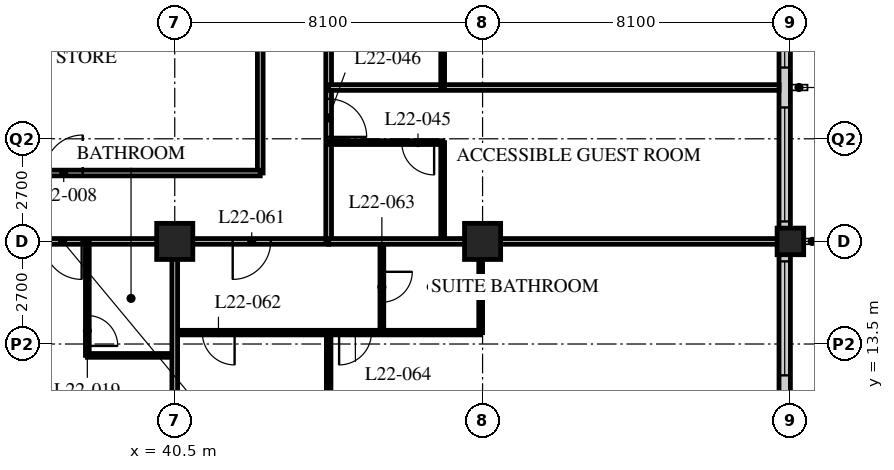
"""IFC4 building model, lengths in metres.
Left out: names, types, materials, properties, quantities, classifications, styles, units other than length and angle.
Written with IfcOpenShell. Run it as: python <this file> out.ifc"""

import sys

from ifc_helpers import new_model, si_unit, direction, frame, frame_2d, origin, origin_2d, place, context, subcontext, project, spatial, rectangle, hollow_rectangle, extrude, element, fill, save


model = new_model("IFC4")
c1 = context("Model", 3, precision=1e-05, world=origin(), true_north=direction((0.0, 1.0)))
c2 = subcontext(c1, "Body", "Model", "MODEL_VIEW")
j1 = project(units=[si_unit("LENGTHUNIT", "METRE"), si_unit("PLANEANGLEUNIT", "RADIAN")], contexts=[c1])
p1 = place(None, origin())
s1 = spatial("IfcSite", under=j1, at=p1, CompositionType="ELEMENT")
p2 = place(p1, origin())
s2 = spatial("IfcBuilding", under=s1, at=p2, CompositionType="ELEMENT")
p3 = place(p2, frame((0.0, 0.0, 87.4)))
s3 = spatial("IfcBuildingStorey", under=s2, at=p3, CompositionType="ELEMENT", Elevation=87.4)
for number, where, z_axis, x_axis in (
    (1, (40.5, 16.2, 0.0), (0.0, 0.0, 1.0), (1.0, 0.0, 0.0)),
    (2, (48.6, 16.2, 0.0), (0.0, 0.0, 1.0), (1.0, 0.0, 0.0)),
):
    element("IfcColumn", number, at=place(p3, frame(where, z_axis=z_axis, x_axis=x_axis)), inside=s3, PredefinedType="COLUMN", context=c2, shape_type="SweptSolid", body=[
        extrude(hollow_rectangle(XDim=0.95, YDim=0.95, WallThickness=0.095, at=origin_2d()), origin(), (0.0, 0.0, 1.0), 3.4),
    ])
p4 = place(p3, frame((56.7, 16.2, 0.0), z_axis=(0.0, 0.0, 1.0), x_axis=(1.0, 0.0, 0.0)))
e3 = element("IfcColumn", 3, at=p4, inside=s3, PredefinedType="COLUMN", context=c2, shape_type="SweptSolid", body=[
    extrude(hollow_rectangle(XDim=0.7, YDim=0.7, WallThickness=0.06, at=origin_2d()), origin(), (0.0, 0.0, 1.0), 3.4),
])
p5 = place(p3, frame((56.55, 8.4, 0.0), z_axis=(0.0, 0.0, 1.0), x_axis=(0.0, 1.0, 0.0)))
e4 = element("IfcWall", 4, at=p5, inside=s3, PredefinedType="SOLIDWALL", context=c2, shape_type="SweptSolid", body=[
    extrude(rectangle(XDim=32.1, YDim=0.3, at=frame_2d((16.05, 0.0))), origin(), (0.0, 0.0, 1.0), 2.05),
])
p6 = place(p5, frame((0.225, 0.0, 0.9)))
e5 = element("IfcOpeningElement", 5, at=p6, cuts=e4, PredefinedType="OPENING", context=c2, shape_type="SweptSolid", body=[
    extrude(rectangle(XDim=3.0, YDim=1.1, at=frame_2d((1.5, 0.55))), frame((0.0, 0.16, 0.0), z_axis=(0.0, -1.0, 0.0), x_axis=(1.0, 0.0, 0.0)), (0.0, 0.0, 1.0), 0.32),
])
p7 = place(p5, frame((4.275, 0.0, 0.9)))
e6 = element("IfcOpeningElement", 6, at=p7, cuts=e4, PredefinedType="OPENING", context=c2, shape_type="SweptSolid", body=[
    extrude(rectangle(XDim=3.0, YDim=1.1, at=frame_2d((1.5, 0.55))), frame((0.0, 0.16, 0.0), z_axis=(0.0, -1.0, 0.0), x_axis=(1.0, 0.0, 0.0)), (0.0, 0.0, 1.0), 0.32),
])
p8 = place(p5, frame((8.325, 0.0, 0.9)))
e7 = element("IfcOpeningElement", 7, at=p8, cuts=e4, PredefinedType="OPENING", context=c2, shape_type="SweptSolid", body=[
    extrude(rectangle(XDim=3.0, YDim=1.1, at=frame_2d((1.5, 0.55))), frame((0.0, 0.16, 0.0), z_axis=(0.0, -1.0, 0.0), x_axis=(1.0, 0.0, 0.0)), (0.0, 0.0, 1.0), 0.32),
])
p9 = place(p5, frame((12.375, 0.0, 0.9)))
e8 = element("IfcOpeningElement", 8, at=p9, cuts=e4, PredefinedType="OPENING", context=c2, shape_type="SweptSolid", body=[
    extrude(rectangle(XDim=3.0, YDim=1.1, at=frame_2d((1.5, 0.55))), frame((0.0, 0.16, 0.0), z_axis=(0.0, -1.0, 0.0), x_axis=(1.0, 0.0, 0.0)), (0.0, 0.0, 1.0), 0.32),
])
p10 = place(p5, frame((16.425, 0.0, 0.9)))
e9 = element("IfcOpeningElement", 9, at=p10, cuts=e4, PredefinedType="OPENING", context=c2, shape_type="SweptSolid", body=[
    extrude(rectangle(XDim=3.0, YDim=1.1, at=frame_2d((1.5, 0.55))), frame((0.0, 0.16, 0.0), z_axis=(0.0, -1.0, 0.0), x_axis=(1.0, 0.0, 0.0)), (0.0, 0.0, 1.0), 0.32),
])
p11 = place(p5, frame((20.475, 0.0, 0.9)))
e10 = element("IfcOpeningElement", 10, at=p11, cuts=e4, PredefinedType="OPENING", context=c2, shape_type="SweptSolid", body=[
    extrude(rectangle(XDim=3.0, YDim=1.1, at=frame_2d((1.5, 0.55))), frame((0.0, 0.16, 0.0), z_axis=(0.0, -1.0, 0.0), x_axis=(1.0, 0.0, 0.0)), (0.0, 0.0, 1.0), 0.32),
])
p12 = place(p5, frame((24.525, 0.0, 0.9)))
e11 = element("IfcOpeningElement", 11, at=p12, cuts=e4, PredefinedType="OPENING", context=c2, shape_type="SweptSolid", body=[
    extrude(rectangle(XDim=3.0, YDim=1.1, at=frame_2d((1.5, 0.55))), frame((0.0, 0.16, 0.0), z_axis=(0.0, -1.0, 0.0), x_axis=(1.0, 0.0, 0.0)), (0.0, 0.0, 1.0), 0.32),
])
p13 = place(p5, frame((28.575, 0.0, 0.9)))
e12 = element("IfcOpeningElement", 12, at=p13, cuts=e4, PredefinedType="OPENING", context=c2, shape_type="SweptSolid", body=[
    extrude(rectangle(XDim=3.0, YDim=1.1, at=frame_2d((1.5, 0.55))), frame((0.0, 0.16, 0.0), z_axis=(0.0, -1.0, 0.0), x_axis=(1.0, 0.0, 0.0)), (0.0, 0.0, 1.0), 0.32),
])
p14 = place(p3, frame((12.15, 16.2, 0.0), z_axis=(0.0, 0.0, 1.0), x_axis=(1.0, 0.0, 0.0)))
e13 = element("IfcWall", 13, at=p14, inside=s3, PredefinedType="PARTITIONING", context=c2, shape_type="SweptSolid", body=[
    extrude(rectangle(XDim=32.4, YDim=0.15, at=frame_2d((16.2, 0.0))), origin(), (0.0, 0.0, 1.0), 2.388),
])
p15 = place(p14, frame((6.5, 0.0, 0.0)))
e14 = element("IfcOpeningElement", 14, at=p15, cuts=e13, PredefinedType="OPENING", context=c2, shape_type="SweptSolid", body=[
    extrude(rectangle(XDim=1.0, YDim=2.1, at=frame_2d((0.5, 1.05))), frame((0.0, 0.085, 0.0), z_axis=(0.0, -1.0, 0.0), x_axis=(1.0, 0.0, 0.0)), (0.0, 0.0, 1.0), 0.17),
])
p16 = place(p14, frame((8.4, 0.0, 0.0)))
e15 = element("IfcOpeningElement", 15, at=p16, cuts=e13, PredefinedType="OPENING", context=c2, shape_type="SweptSolid", body=[
    extrude(rectangle(XDim=1.0, YDim=2.1, at=frame_2d((0.5, 1.05))), frame((0.0, 0.085, 0.0), z_axis=(0.0, -1.0, 0.0), x_axis=(1.0, 0.0, 0.0)), (0.0, 0.0, 1.0), 0.17),
])
p17 = place(p14, frame((14.9, 0.0, 0.0)))
e16 = element("IfcOpeningElement", 16, at=p17, cuts=e13, PredefinedType="OPENING", context=c2, shape_type="SweptSolid", body=[
    extrude(rectangle(XDim=1.0, YDim=2.1, at=frame_2d((0.5, 1.05))), frame((0.0, 0.085, 0.0), z_axis=(0.0, -1.0, 0.0), x_axis=(1.0, 0.0, 0.0)), (0.0, 0.0, 1.0), 0.17),
])
p18 = place(p14, frame((16.5, 0.0, 0.0)))
e17 = element("IfcOpeningElement", 17, at=p18, cuts=e13, PredefinedType="OPENING", context=c2, shape_type="SweptSolid", body=[
    extrude(rectangle(XDim=1.0, YDim=2.1, at=frame_2d((0.5, 1.05))), frame((0.0, 0.085, 0.0), z_axis=(0.0, -1.0, 0.0), x_axis=(1.0, 0.0, 0.0)), (0.0, 0.0, 1.0), 0.17),
])
p19 = place(p14, frame((23.0, 0.0, 0.0)))
e18 = element("IfcOpeningElement", 18, at=p19, cuts=e13, PredefinedType="OPENING", context=c2, shape_type="SweptSolid", body=[
    extrude(rectangle(XDim=1.0, YDim=2.1, at=frame_2d((0.5, 1.05))), frame((0.0, 0.085, 0.0), z_axis=(0.0, -1.0, 0.0), x_axis=(1.0, 0.0, 0.0)), (0.0, 0.0, 1.0), 0.17),
])
p20 = place(p14, frame((24.9, 0.0, 0.0)))
e19 = element("IfcOpeningElement", 19, at=p20, cuts=e13, PredefinedType="OPENING", context=c2, shape_type="SweptSolid", body=[
    extrude(rectangle(XDim=1.0, YDim=2.1, at=frame_2d((0.5, 1.05))), frame((0.0, 0.085, 0.0), z_axis=(0.0, -1.0, 0.0), x_axis=(1.0, 0.0, 0.0)), (0.0, 0.0, 1.0), 0.17),
])
p21 = place(p14, frame((1.525, 0.0, 0.0)))
e20 = element("IfcOpeningElement", 20, at=p21, cuts=e13, PredefinedType="OPENING", context=c2, shape_type="SweptSolid", body=[
    extrude(rectangle(XDim=1.0, YDim=2.1, at=frame_2d((0.5, 1.05))), frame((0.0, 0.085, 0.0), z_axis=(0.0, -1.0, 0.0), x_axis=(1.0, 0.0, 0.0)), (0.0, 0.0, 1.0), 0.17),
])
p22 = place(p14, frame((29.875, 0.0, 0.0)))
e21 = element("IfcOpeningElement", 21, at=p22, cuts=e13, PredefinedType="OPENING", context=c2, shape_type="SweptSolid", body=[
    extrude(rectangle(XDim=1.0, YDim=2.1, at=frame_2d((0.5, 1.05))), frame((0.0, 0.085, 0.0), z_axis=(0.0, -1.0, 0.0), x_axis=(1.0, 0.0, 0.0)), (0.0, 0.0, 1.0), 0.17),
])
p23 = place(p3, frame((44.55, 16.2, 0.0), z_axis=(0.0, 0.0, 1.0), x_axis=(0.0, 1.0, 0.0)))
e22 = element("IfcWall", 22, at=p23, inside=s3, PredefinedType="PARTITIONING", context=c2, shape_type="SweptSolid", body=[
    extrude(rectangle(XDim=26.1, YDim=0.15, at=frame_2d((13.05, 0.0))), origin(), (0.0, 0.0, 1.0), 3.15),
])
p24 = place(p23, frame((2.75, 0.0, 0.0)))
e23 = element("IfcOpeningElement", 23, at=p24, cuts=e22, PredefinedType="OPENING", context=c2, shape_type="SweptSolid", body=[
    extrude(rectangle(XDim=1.0, YDim=2.1, at=frame_2d((0.5, 1.05))), frame((0.0, 0.085, 0.0), z_axis=(0.0, -1.0, 0.0), x_axis=(1.0, 0.0, 0.0)), (0.0, 0.0, 1.0), 0.17),
])
p25 = place(p23, frame((6.5, 0.0, 0.0)))
e24 = element("IfcOpeningElement", 24, at=p25, cuts=e22, PredefinedType="OPENING", context=c2, shape_type="SweptSolid", body=[
    extrude(rectangle(XDim=1.0, YDim=2.1, at=frame_2d((0.5, 1.05))), frame((0.0, 0.085, 0.0), z_axis=(0.0, -1.0, 0.0), x_axis=(1.0, 0.0, 0.0)), (0.0, 0.0, 1.0), 0.17),
])
p26 = place(p23, frame((10.0, 0.0, 0.0)))
e25 = element("IfcOpeningElement", 25, at=p26, cuts=e22, PredefinedType="OPENING", context=c2, shape_type="SweptSolid", body=[
    extrude(rectangle(XDim=1.0, YDim=2.1, at=frame_2d((0.5, 1.05))), frame((0.0, 0.085, 0.0), z_axis=(0.0, -1.0, 0.0), x_axis=(1.0, 0.0, 0.0)), (0.0, 0.0, 1.0), 0.17),
])
p27 = place(p23, frame((18.1, 0.0, 0.0)))
e26 = element("IfcOpeningElement", 26, at=p27, cuts=e22, PredefinedType="OPENING", context=c2, shape_type="SweptSolid", body=[
    extrude(rectangle(XDim=1.0, YDim=2.1, at=frame_2d((0.5, 1.05))), frame((0.0, 0.085, 0.0), z_axis=(0.0, -1.0, 0.0), x_axis=(1.0, 0.0, 0.0)), (0.0, 0.0, 1.0), 0.17),
])
p28 = place(p3, frame((42.75, 18.0, 0.0), z_axis=(0.0, 0.0, 1.0), x_axis=(0.0, 1.0, 0.0)))
e27 = element("IfcWall", 27, at=p28, inside=s3, PredefinedType="PARTITIONING", context=c2, shape_type="SweptSolid", body=[
    extrude(rectangle(XDim=22.5, YDim=0.15, at=frame_2d((11.25, 0.0))), origin(), (0.0, 0.0, 1.0), 3.15),
])
p29 = place(p28, frame((9.85, 0.0, 0.0)))
e28 = element("IfcOpeningElement", 28, at=p29, cuts=e27, PredefinedType="OPENING", context=c2, shape_type="SweptSolid", body=[
    extrude(rectangle(XDim=1.0, YDim=2.1, at=frame_2d((0.5, 1.05))), frame((0.0, 0.085, 0.0), z_axis=(0.0, -1.0, 0.0), x_axis=(1.0, 0.0, 0.0)), (0.0, 0.0, 1.0), 0.17),
])
p30 = place(p28, frame((17.95, 0.0, 0.0)))
e29 = element("IfcOpeningElement", 29, at=p30, cuts=e27, PredefinedType="OPENING", context=c2, shape_type="SweptSolid", body=[
    extrude(rectangle(XDim=1.0, YDim=2.1, at=frame_2d((0.5, 1.05))), frame((0.0, 0.085, 0.0), z_axis=(0.0, -1.0, 0.0), x_axis=(1.0, 0.0, 0.0)), (0.0, 0.0, 1.0), 0.17),
])
p31 = place(p3, frame((29.56, 18.0, 0.0), z_axis=(0.0, 0.0, 1.0), x_axis=(1.0, 0.0, 0.0)))
e30 = element("IfcWall", 30, at=p31, inside=s3, PredefinedType="PARTITIONING", context=c2, shape_type="SweptSolid", body=[
    extrude(rectangle(XDim=13.19, YDim=0.15, at=frame_2d((6.595, 0.0))), origin(), (0.0, 0.0, 1.0), 3.15),
])
p32 = place(p31, frame((0.919, 0.0, 0.0)))
e31 = element("IfcOpeningElement", 31, at=p32, cuts=e30, PredefinedType="OPENING", context=c2, shape_type="SweptSolid", body=[
    extrude(rectangle(XDim=1.0, YDim=2.1, at=frame_2d((0.5, 1.05))), frame((0.0, 0.085, 0.0), z_axis=(0.0, -1.0, 0.0), x_axis=(1.0, 0.0, 0.0)), (0.0, 0.0, 1.0), 0.17),
])
p33 = place(p31, frame((7.519, 0.0, 0.0)))
e32 = element("IfcOpeningElement", 32, at=p33, cuts=e30, PredefinedType="OPENING", context=c2, shape_type="SweptSolid", body=[
    extrude(rectangle(XDim=1.0, YDim=2.1, at=frame_2d((0.5, 1.05))), frame((0.0, 0.085, 0.0), z_axis=(0.0, -1.0, 0.0), x_axis=(1.0, 0.0, 0.0)), (0.0, 0.0, 1.0), 0.17),
])
p34 = place(p3, frame((38.2, 13.2, 0.0), z_axis=(0.0, 0.0, 1.0), x_axis=(1.0, 0.0, 0.0)))
e33 = element("IfcWall", 33, at=p34, inside=s3, PredefinedType="PARTITIONING", context=c2, shape_type="SweptSolid", body=[
    extrude(rectangle(XDim=2.3, YDim=0.1, at=frame_2d((1.15, 0.0))), origin(), (0.0, 0.0, 1.0), 3.15),
])
p35 = place(p3, frame((38.2, 16.2, 0.0), z_axis=(0.0, 0.0, 1.0), x_axis=(0.0, -1.0, 0.0)))
e34 = element("IfcWall", 34, at=p35, inside=s3, PredefinedType="PARTITIONING", context=c2, shape_type="SweptSolid", body=[
    extrude(rectangle(XDim=3.0, YDim=0.1, at=frame_2d((1.5, 0.0))), origin(), (0.0, 0.0, 1.0), 3.15),
])
p36 = place(p35, frame((1.95, 0.0, 0.0)))
e35 = element("IfcOpeningElement", 35, at=p36, cuts=e34, PredefinedType="OPENING", context=c2, shape_type="SweptSolid", body=[
    extrude(rectangle(XDim=0.8, YDim=2.1, at=frame_2d((0.4, 1.05))), frame((0.0, 0.06, 0.0), z_axis=(0.0, -1.0, 0.0), x_axis=(1.0, 0.0, 0.0)), (0.0, 0.0, 1.0), 0.12),
])
p37 = place(p3, frame((47.55, 16.2, 0.0), z_axis=(0.0, 0.0, 1.0), x_axis=(0.0, 1.0, 0.0)))
e36 = element("IfcWall", 36, at=p37, inside=s3, PredefinedType="PARTITIONING", context=c2, shape_type="SweptSolid", body=[
    extrude(rectangle(XDim=2.6, YDim=0.1, at=frame_2d((1.3, 0.0))), origin(), (0.0, 0.0, 1.0), 3.15),
])
p38 = place(p3, frame((44.55, 18.8, 0.0), z_axis=(0.0, 0.0, 1.0), x_axis=(1.0, 0.0, 0.0)))
e37 = element("IfcWall", 37, at=p38, inside=s3, PredefinedType="PARTITIONING", context=c2, shape_type="SweptSolid", body=[
    extrude(rectangle(XDim=3.0, YDim=0.1, at=frame_2d((1.5, 0.0))), origin(), (0.0, 0.0, 1.0), 3.15),
])
p39 = place(p38, frame((1.925, 0.0, 0.0)))
e38 = element("IfcOpeningElement", 38, at=p39, cuts=e37, PredefinedType="OPENING", context=c2, shape_type="SweptSolid", body=[
    extrude(rectangle(XDim=0.85, YDim=2.1, at=frame_2d((0.425, 1.05))), frame((0.0, 0.06, 0.0), z_axis=(0.0, -1.0, 0.0), x_axis=(1.0, 0.0, 0.0)), (0.0, 0.0, 1.0), 0.12),
])
p40 = place(p3, frame((44.55, 20.25, 0.0), z_axis=(0.0, 0.0, 1.0), x_axis=(1.0, 0.0, 0.0)))
e39 = element("IfcWall", 39, at=p40, inside=s3, PredefinedType="PARTITIONING", context=c2, shape_type="SweptSolid", body=[
    extrude(rectangle(XDim=11.85, YDim=0.15, at=frame_2d((5.925, 0.0))), origin(), (0.0, 0.0, 1.0), 3.15),
])
p41 = place(p3, frame((47.55, 20.25, 0.0), z_axis=(0.0, 0.0, 1.0), x_axis=(0.0, 1.0, 0.0)))
e40 = element("IfcWall", 40, at=p41, inside=s3, PredefinedType="PARTITIONING", context=c2, shape_type="SweptSolid", body=[
    extrude(rectangle(XDim=2.3, YDim=0.1, at=frame_2d((1.15, 0.0))), origin(), (0.0, 0.0, 1.0), 3.15),
])
p42 = place(p3, frame((40.5, 13.8, 0.0), z_axis=(0.0, 0.0, 1.0), x_axis=(1.0, 0.0, 0.0)))
e41 = element("IfcWall", 41, at=p42, inside=s3, PredefinedType="PARTITIONING", context=c2, shape_type="SweptSolid", body=[
    extrude(rectangle(XDim=8.05, YDim=0.12, at=frame_2d((4.025, 0.0))), origin(), (0.0, 0.0, 1.0), 3.15),
])
p43 = place(p42, frame((0.725, 0.0, 0.0)))
e42 = element("IfcOpeningElement", 42, at=p43, cuts=e41, PredefinedType="OPENING", context=c2, shape_type="SweptSolid", body=[
    extrude(rectangle(XDim=0.85, YDim=2.1, at=frame_2d((0.425, 1.05))), frame((0.0, 0.07, 0.0), z_axis=(0.0, -1.0, 0.0), x_axis=(1.0, 0.0, 0.0)), (0.0, 0.0, 1.0), 0.14),
])
p44 = place(p42, frame((4.325, 0.0, 0.0)))
e43 = element("IfcOpeningElement", 43, at=p44, cuts=e41, PredefinedType="OPENING", context=c2, shape_type="SweptSolid", body=[
    extrude(rectangle(XDim=0.85, YDim=2.1, at=frame_2d((0.425, 1.05))), frame((0.0, 0.07, 0.0), z_axis=(0.0, -1.0, 0.0), x_axis=(1.0, 0.0, 0.0)), (0.0, 0.0, 1.0), 0.14),
])
p45 = place(p3, frame((45.95, 16.2, 0.0), z_axis=(0.0, 0.0, 1.0), x_axis=(0.0, -1.0, 0.0)))
e44 = element("IfcWall", 44, at=p45, inside=s3, PredefinedType="PARTITIONING", context=c2, shape_type="SweptSolid", body=[
    extrude(rectangle(XDim=2.4, YDim=0.1, at=frame_2d((1.2, 0.0))), origin(), (0.0, 0.0, 1.0), 3.15),
])
p46 = place(p45, frame((0.8, 0.0, 0.0)))
e45 = element("IfcOpeningElement", 45, at=p46, cuts=e44, PredefinedType="OPENING", context=c2, shape_type="SweptSolid", body=[
    extrude(rectangle(XDim=0.8, YDim=2.1, at=frame_2d((0.4, 1.05))), frame((0.0, 0.06, 0.0), z_axis=(0.0, -1.0, 0.0), x_axis=(1.0, 0.0, 0.0)), (0.0, 0.0, 1.0), 0.12),
])
p47 = place(p3, frame((48.55, 16.2, 0.0), z_axis=(0.0, 0.0, 1.0), x_axis=(0.0, -1.0, 0.0)))
e46 = element("IfcWall", 46, at=p47, inside=s3, PredefinedType="PARTITIONING", context=c2, shape_type="SweptSolid", body=[
    extrude(rectangle(XDim=2.4, YDim=0.1, at=frame_2d((1.2, 0.0))), origin(), (0.0, 0.0, 1.0), 2.05),
])
p48 = place(p3, frame((44.55, 13.8, 0.0), z_axis=(0.0, 0.0, 1.0), x_axis=(0.0, -1.0, 0.0)))
e47 = element("IfcWall", 47, at=p48, inside=s3, PredefinedType="PARTITIONING", context=c2, shape_type="SweptSolid", body=[
    extrude(rectangle(XDim=13.5, YDim=0.12, at=frame_2d((6.75, 0.0))), origin(), (0.0, 0.0, 1.0), 3.15),
])
p49 = place(p3, frame((44.55, 16.2, 0.0), z_axis=(0.0, 0.0, 1.0), x_axis=(1.0, 0.0, 0.0)))
e48 = element("IfcWall", 48, at=p49, inside=s3, PredefinedType="PARTITIONING", context=c2, shape_type="SweptSolid", body=[
    extrude(rectangle(XDim=11.85, YDim=0.15, at=frame_2d((5.925, 0.0))), origin(), (0.0, 0.0, 1.0), 2.388),
])
p50 = place(p3, frame((40.5, 16.2, 0.0), z_axis=(0.0, 0.0, 1.0), x_axis=(0.0, -1.0, 0.0)))
e49 = element("IfcWall", 49, at=p50, inside=s3, PredefinedType="PARTITIONING", context=c2, shape_type="SweptSolid", body=[
    extrude(rectangle(XDim=15.9, YDim=0.15, at=frame_2d((7.95, 0.0))), origin(), (0.0, 0.0, 1.0), 2.05),
])
p51 = place(p7, origin())
e50 = element("IfcWindow", 50, at=p51, inside=s3, PartitioningType="SINGLE_PANEL", PredefinedType="WINDOW", context=c2, shape_type="SweptSolid", body=[
    extrude(rectangle(XDim=3.0, YDim=1.1, at=frame_2d((1.5, 0.55))), frame((0.0, 0.03, 0.0), z_axis=(0.0, -1.0, 0.0), x_axis=(1.0, 0.0, 0.0)), (0.0, 0.0, 1.0), 0.06),
])
fill(e6, e50)
p52 = place(p8, origin())
e51 = element("IfcWindow", 51, at=p52, inside=s3, PartitioningType="SINGLE_PANEL", PredefinedType="WINDOW", context=c2, shape_type="SweptSolid", body=[
    extrude(rectangle(XDim=3.0, YDim=1.1, at=frame_2d((1.5, 0.55))), frame((0.0, 0.03, 0.0), z_axis=(0.0, -1.0, 0.0), x_axis=(1.0, 0.0, 0.0)), (0.0, 0.0, 1.0), 0.06),
])
fill(e7, e51)
p53 = place(p9, origin())
e52 = element("IfcWindow", 52, at=p53, inside=s3, PartitioningType="SINGLE_PANEL", PredefinedType="WINDOW", context=c2, shape_type="SweptSolid", body=[
    extrude(rectangle(XDim=3.0, YDim=1.1, at=frame_2d((1.5, 0.55))), frame((0.0, 0.03, 0.0), z_axis=(0.0, -1.0, 0.0), x_axis=(1.0, 0.0, 0.0)), (0.0, 0.0, 1.0), 0.06),
])
fill(e8, e52)
p54 = place(p33, origin())
e53 = element("IfcDoor", 53, at=p54, inside=s3, OperationType="SINGLE_SWING_RIGHT", PredefinedType="DOOR", context=c2, shape_type="SweptSolid", body=[
    extrude(rectangle(XDim=1.0, YDim=2.1, at=frame_2d((0.5, 1.05))), frame((0.0, 0.025, 0.0), z_axis=(0.0, -1.0, 0.0), x_axis=(1.0, 0.0, 0.0)), (0.0, 0.0, 1.0), 0.05),
])
fill(e32, e53)
p55 = place(p36, origin())
e54 = element("IfcDoor", 54, at=p55, inside=s3, OperationType="SINGLE_SWING_RIGHT", PredefinedType="DOOR", context=c2, shape_type="SweptSolid", body=[
    extrude(rectangle(XDim=0.8, YDim=2.1, at=frame_2d((0.4, 1.05))), frame((0.0, 0.025, 0.0), z_axis=(0.0, -1.0, 0.0), x_axis=(1.0, 0.0, 0.0)), (0.0, 0.0, 1.0), 0.05),
])
fill(e35, e54)
p56 = place(p20, origin())
e55 = element("IfcDoor", 55, at=p56, inside=s3, OperationType="SINGLE_SWING_LEFT", PredefinedType="DOOR", context=c2, shape_type="SweptSolid", body=[
    extrude(rectangle(XDim=1.0, YDim=2.1, at=frame_2d((0.5, 1.05))), frame((0.0, 0.025, 0.0), z_axis=(0.0, -1.0, 0.0), x_axis=(1.0, 0.0, 0.0)), (0.0, 0.0, 1.0), 0.05),
])
fill(e19, e55)
p57 = place(p39, origin())
e56 = element("IfcDoor", 56, at=p57, inside=s3, OperationType="SINGLE_SWING_LEFT", PredefinedType="DOOR", context=c2, shape_type="SweptSolid", body=[
    extrude(rectangle(XDim=0.85, YDim=2.1, at=frame_2d((0.425, 1.05))), frame((0.0, 0.025, 0.0), z_axis=(0.0, -1.0, 0.0), x_axis=(1.0, 0.0, 0.0)), (0.0, 0.0, 1.0), 0.05),
])
fill(e38, e56)
p58 = place(p24, origin())
e57 = element("IfcDoor", 57, at=p58, inside=s3, OperationType="SINGLE_SWING_RIGHT", PredefinedType="DOOR", context=c2, shape_type="SweptSolid", body=[
    extrude(rectangle(XDim=1.0, YDim=2.1, at=frame_2d((0.5, 1.05))), frame((0.0, 0.025, 0.0), z_axis=(0.0, -1.0, 0.0), x_axis=(1.0, 0.0, 0.0)), (0.0, 0.0, 1.0), 0.05),
])
fill(e23, e57)
p59 = place(p22, origin())
e58 = element("IfcDoor", 58, at=p59, inside=s3, OperationType="SINGLE_SWING_RIGHT", PredefinedType="DOOR", context=c2, shape_type="SweptSolid", body=[
    extrude(rectangle(XDim=1.0, YDim=2.1, at=frame_2d((0.5, 1.05))), frame((0.0, 0.025, 0.0), z_axis=(0.0, -1.0, 0.0), x_axis=(1.0, 0.0, 0.0)), (0.0, 0.0, 1.0), 0.05),
])
fill(e21, e58)
p60 = place(p43, origin())
e59 = element("IfcDoor", 59, at=p60, inside=s3, OperationType="SINGLE_SWING_LEFT", PredefinedType="DOOR", context=c2, shape_type="SweptSolid", body=[
    extrude(rectangle(XDim=0.85, YDim=2.1, at=frame_2d((0.425, 1.05))), frame((0.0, 0.025, 0.0), z_axis=(0.0, -1.0, 0.0), x_axis=(1.0, 0.0, 0.0)), (0.0, 0.0, 1.0), 0.05),
])
fill(e42, e59)
p61 = place(p46, origin())
e60 = element("IfcDoor", 60, at=p61, inside=s3, OperationType="SINGLE_SWING_LEFT", PredefinedType="DOOR", context=c2, shape_type="SweptSolid", body=[
    extrude(rectangle(XDim=0.8, YDim=2.1, at=frame_2d((0.4, 1.05))), frame((0.0, 0.025, 0.0), z_axis=(0.0, -1.0, 0.0), x_axis=(1.0, 0.0, 0.0)), (0.0, 0.0, 1.0), 0.05),
])
fill(e45, e60)
p62 = place(p44, origin())
e61 = element("IfcDoor", 61, at=p62, inside=s3, OperationType="SINGLE_SWING_RIGHT", PredefinedType="DOOR", context=c2, shape_type="SweptSolid", body=[
    extrude(rectangle(XDim=0.85, YDim=2.1, at=frame_2d((0.425, 1.05))), frame((0.0, 0.025, 0.0), z_axis=(0.0, -1.0, 0.0), x_axis=(1.0, 0.0, 0.0)), (0.0, 0.0, 1.0), 0.05),
])
fill(e43, e61)
save(model, sys.argv[1])
